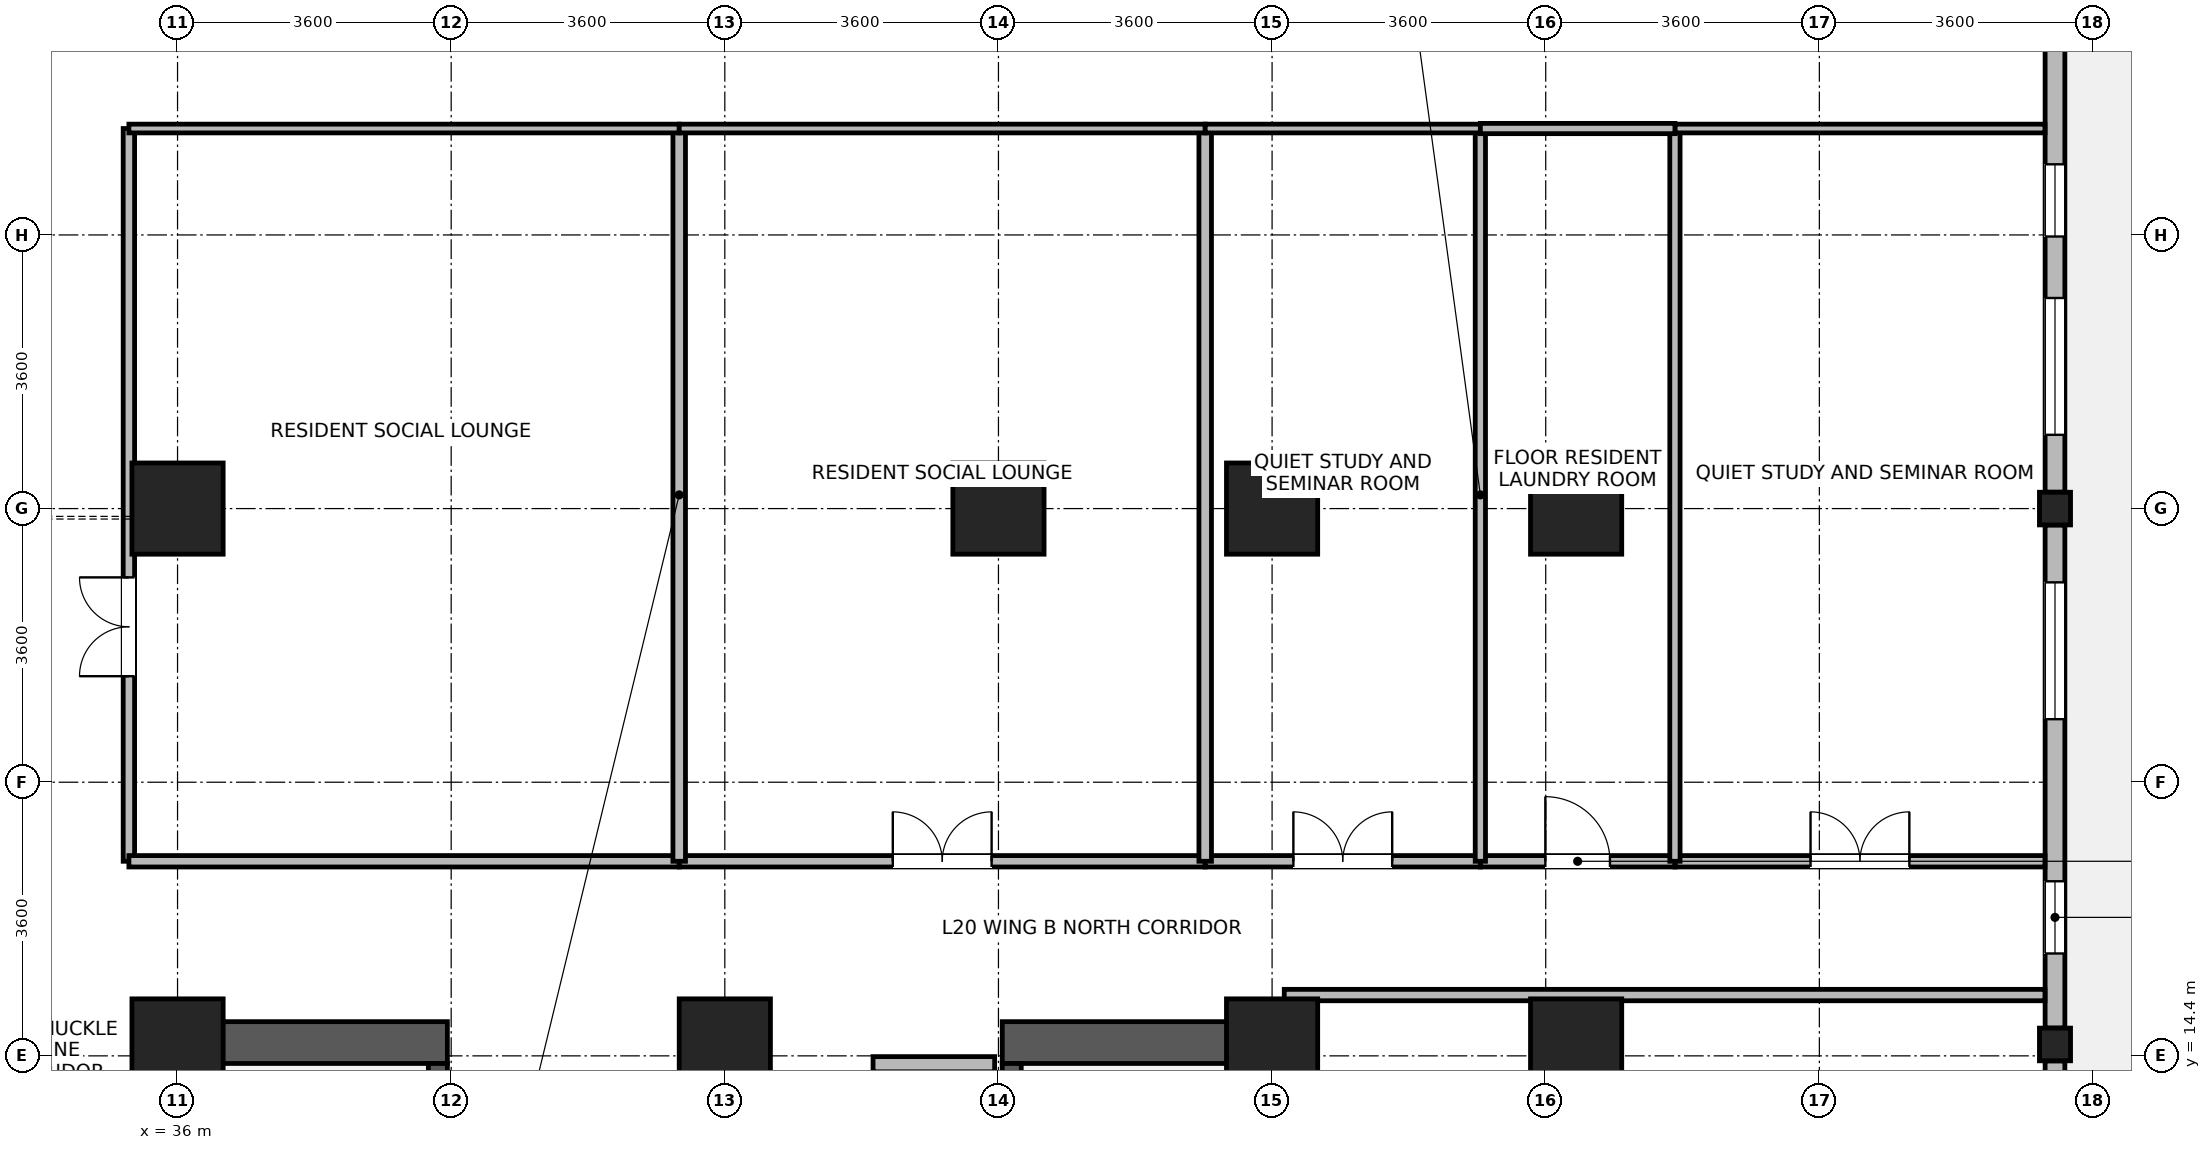
"""IFC4 building model, lengths in metres.
Left out: names, types, materials, properties, quantities, classifications, styles, units other than length and angle.
Written with IfcOpenShell. Run it as: python <this file> out.ifc"""

import sys

from ifc_helpers import new_model, si_unit, direction, frame, frame_2d, origin, origin_2d, place, context, subcontext, project, spatial, rectangle, i_section, extrude, source, transform, mapped, element, fill, save


model = new_model("IFC4")
c1 = context("Model", 3, precision=1e-05, world=origin(), true_north=direction((0.0, 1.0)))
c2 = subcontext(c1, "Body", "Model", "MODEL_VIEW")
j1 = project(units=[si_unit("LENGTHUNIT", "METRE"), si_unit("PLANEANGLEUNIT", "RADIAN")], contexts=[c1])
p1 = place(None, origin())
s1 = spatial("IfcSite", under=j1, at=p1, CompositionType="ELEMENT")
p2 = place(p1, origin())
s2 = spatial("IfcBuilding", under=s1, at=p2, CompositionType="ELEMENT")
p3 = place(p2, frame((0.0, 0.0, 82.3)))
s3 = spatial("IfcBuildingStorey", under=s2, at=p3, CompositionType="ELEMENT", Elevation=82.3)
for number, where, z_axis, x_axis in (
    (1, (36.075, 6.75, 0.0), (0.0, 0.0, 1.0), (0.0, 1.0, 0.0)),
    (2, (50.325, 6.75, 0.0), (0.0, 0.0, 1.0), (0.0, 1.0, 0.0)),
):
    element("IfcWall", number, at=place(p3, frame(where, z_axis=z_axis, x_axis=x_axis)), inside=s3, PredefinedType="SHEAR", context=c2, shape_type="SweptSolid", body=[
        extrude(rectangle(XDim=8.1, YDim=0.55, at=frame_2d((4.05, 0.0))), origin(), (0.0, 0.0, 1.0), 3.45),
    ])
for number, where, z_axis, x_axis in (
    (3, (36.35, 14.575, 0.0), (0.0, 0.0, 1.0), (1.0, 0.0, 0.0)),
    (4, (46.85, 14.575, 0.0), (0.0, 0.0, 1.0), (1.0, 0.0, 0.0)),
):
    element("IfcWall", number, at=place(p3, frame(where, z_axis=z_axis, x_axis=x_axis)), inside=s3, PredefinedType="SHEAR", context=c2, shape_type="SweptSolid", body=[
        extrude(rectangle(XDim=3.2, YDim=0.55, at=frame_2d((1.6, 0.0))), origin(), (0.0, 0.0, 1.0), 3.45),
    ])
p4 = place(p3, frame((39.425, 7.3, 0.0), z_axis=(0.0, 0.0, 1.0), x_axis=(0.0, 1.0, 0.0)))
e5 = element("IfcWall", 5, at=p4, inside=s3, PredefinedType="SHEAR", context=c2, shape_type="SweptSolid", body=[
    extrude(rectangle(XDim=7.0, YDim=0.25, at=frame_2d((3.5, 0.0))), origin(), (0.0, 0.0, 1.0), 3.45),
])
p5 = place(p4, frame((0.15, 0.0, 0.0)))
e6 = element("IfcOpeningElement", 6, at=p5, cuts=e5, PredefinedType="OPENING", context=c2, shape_type="SweptSolid", body=[
    extrude(rectangle(XDim=1.1, YDim=2.08, at=frame_2d((0.55, 1.04))), frame((0.0, 0.135, 0.0), z_axis=(0.0, -1.0, 0.0), x_axis=(1.0, 0.0, 0.0)), (0.0, 0.0, 1.0), 0.27),
])
p6 = place(p3, frame((46.975, 7.3, 0.0), z_axis=(0.0, 0.0, 1.0), x_axis=(0.0, 1.0, 0.0)))
e7 = element("IfcWall", 7, at=p6, inside=s3, PredefinedType="SHEAR", context=c2, shape_type="SweptSolid", body=[
    extrude(rectangle(XDim=7.0, YDim=0.25, at=frame_2d((3.5, 0.0))), origin(), (0.0, 0.0, 1.0), 3.45),
])
p7 = place(p6, frame((0.15, 0.0, 0.0)))
e8 = element("IfcOpeningElement", 8, at=p7, cuts=e7, PredefinedType="OPENING", context=c2, shape_type="SweptSolid", body=[
    extrude(rectangle(XDim=1.1, YDim=2.08, at=frame_2d((0.55, 1.04))), frame((0.0, 0.135, 0.0), z_axis=(0.0, -1.0, 0.0), x_axis=(1.0, 0.0, 0.0)), (0.0, 0.0, 1.0), 0.27),
])
m1 = source(origin(), c2, "Body", "SweptSolid", [
    extrude(rectangle(XDim=1.2, YDim=1.2, at=origin_2d()), origin(), (0.0, 0.0, 1.0), 3.7),
])
for number, where, z_axis, x_axis in (
    (9, (36.0, 21.6, 0.0), (0.0, 0.0, 1.0), (1.0, 0.0, 0.0)),
    (10, (46.8, 21.6, 0.0), (0.0, 0.0, 1.0), (1.0, 0.0, 0.0)),
    (11, (36.0, 14.55, 0.0), (0.0, 0.0, 1.0), (1.0, 0.0, 0.0)),
    (12, (43.2, 14.55, 0.0), (0.0, 0.0, 1.0), (1.0, 0.0, 0.0)),
    (13, (50.4, 14.55, 0.0), (0.0, 0.0, 1.0), (1.0, 0.0, 0.0)),
    (14, (50.4, 21.6, 0.0), (0.0, 0.0, 1.0), (1.0, 0.0, 0.0)),
    (15, (54.4, 14.55, 0.0), (0.0, 0.0, 1.0), (1.0, 0.0, 0.0)),
    (16, (54.4, 21.6, 0.0), (0.0, 0.0, 1.0), (1.0, 0.0, 0.0)),
):
    element("IfcColumn", number, at=place(p3, frame(where, z_axis=z_axis, x_axis=x_axis)), inside=s3, PredefinedType="COLUMN", context=c2, shape_type="MappedRepresentation", body=[
        mapped(m1, transform((0.0, 0.0, 0.0), x_axis=(1.0, 0.0, 0.0), y_axis=(0.0, 1.0, 0.0), z_axis=(0.0, 0.0, 1.0), scale=1.0)),
    ])
m2 = source(origin(), c2, "Body", "SweptSolid", [
    extrude(i_section(OverallWidth=0.409, OverallDepth=0.43, WebThickness=0.024, FlangeThickness=0.033, FilletRadius=0.015, at=origin_2d()), origin(), (0.0, 0.0, 1.0), 3.7),
])
for number, where, z_axis, x_axis in (
    (17, (60.7, 14.55, 0.0), (0.0, 0.0, 1.0), (1.0, 0.0, 0.0)),
    (18, (60.7, 21.6, 0.0), (0.0, 0.0, 1.0), (1.0, 0.0, 0.0)),
):
    element("IfcColumn", number, at=place(p3, frame(where, z_axis=z_axis, x_axis=x_axis)), inside=s3, PredefinedType="COLUMN", context=c2, shape_type="MappedRepresentation", body=[
        mapped(m2, transform((0.0, 0.0, 0.0), x_axis=(1.0, 0.0, 0.0), y_axis=(0.0, 1.0, 0.0), z_axis=(0.0, 0.0, 1.0), scale=1.0)),
    ])
p8 = place(p3, frame((60.7, 14.334, 0.0), z_axis=(0.0, 0.0, 1.0), x_axis=(0.0, -1.0, 0.0)))
e19 = element("IfcWall", 19, at=p8, inside=s3, PredefinedType="STANDARD", context=c2, shape_type="SweptSolid", body=[
    extrude(rectangle(XDim=7.068, YDim=0.26, at=frame_2d((3.534, 0.0))), origin(), (0.0, 0.0, 1.0), 2.93),
])
p9 = place(p8, frame((0.867, 0.0, 0.85)))
e20 = element("IfcOpeningElement", 20, at=p9, cuts=e19, PredefinedType="OPENING", context=c2, shape_type="SweptSolid", body=[
    extrude(rectangle(XDim=1.8, YDim=1.85, at=frame_2d((0.9, 0.925))), frame((0.0, 0.14, 0.0), z_axis=(0.0, -1.0, 0.0), x_axis=(1.0, 0.0, 0.0)), (0.0, 0.0, 1.0), 0.28),
])
p10 = place(p8, frame((4.401, 0.0, 0.85)))
e21 = element("IfcOpeningElement", 21, at=p10, cuts=e19, PredefinedType="OPENING", context=c2, shape_type="SweptSolid", body=[
    extrude(rectangle(XDim=1.8, YDim=1.85, at=frame_2d((0.9, 0.925))), frame((0.0, 0.14, 0.0), z_axis=(0.0, -1.0, 0.0), x_axis=(1.0, 0.0, 0.0)), (0.0, 0.0, 1.0), 0.28),
])
p11 = place(p3, frame((60.7, 21.384, 0.0), z_axis=(0.0, 0.0, 1.0), x_axis=(0.0, -1.0, 0.0)))
e22 = element("IfcWall", 22, at=p11, inside=s3, PredefinedType="STANDARD", context=c2, shape_type="SweptSolid", body=[
    extrude(rectangle(XDim=6.618, YDim=0.26, at=frame_2d((3.309, 0.0))), origin(), (0.0, 0.0, 1.0), 2.93),
])
p12 = place(p11, frame((0.754, 0.0, 0.85)))
e23 = element("IfcOpeningElement", 23, at=p12, cuts=e22, PredefinedType="OPENING", context=c2, shape_type="SweptSolid", body=[
    extrude(rectangle(XDim=1.8, YDim=1.85, at=frame_2d((0.9, 0.925))), frame((0.0, 0.14, 0.0), z_axis=(0.0, -1.0, 0.0), x_axis=(1.0, 0.0, 0.0)), (0.0, 0.0, 1.0), 0.28),
])
p13 = place(p11, frame((4.687, 0.0, 0.85)))
e24 = element("IfcOpeningElement", 24, at=p13, cuts=e22, PredefinedType="OPENING", context=c2, shape_type="SweptSolid", body=[
    extrude(rectangle(XDim=0.95, YDim=1.75, at=frame_2d((0.475, 0.875))), frame((0.0, 0.14, 0.0), z_axis=(0.0, -1.0, 0.0), x_axis=(1.0, 0.0, 0.0)), (0.0, 0.0, 1.0), 0.28),
])
p14 = place(p3, frame((60.7, 28.434, 0.0), z_axis=(0.0, 0.0, 1.0), x_axis=(0.0, -1.0, 0.0)))
e25 = element("IfcWall", 25, at=p14, inside=s3, PredefinedType="STANDARD", context=c2, shape_type="SweptSolid", body=[
    extrude(rectangle(XDim=6.618, YDim=0.26, at=frame_2d((3.309, 0.0))), origin(), (0.0, 0.0, 1.0), 2.93),
])
p15 = place(p14, frame((4.063, 0.0, 0.85)))
e26 = element("IfcOpeningElement", 26, at=p15, cuts=e25, PredefinedType="OPENING", context=c2, shape_type="SweptSolid", body=[
    extrude(rectangle(XDim=1.8, YDim=1.85, at=frame_2d((0.9, 0.925))), frame((0.0, 0.14, 0.0), z_axis=(0.0, -1.0, 0.0), x_axis=(1.0, 0.0, 0.0)), (0.0, 0.0, 1.0), 0.28),
])
p16 = place(p14, frame((2.305, 0.0, 0.85)))
e27 = element("IfcOpeningElement", 27, at=p16, cuts=e25, PredefinedType="OPENING", context=c2, shape_type="SweptSolid", body=[
    extrude(rectangle(XDim=0.95, YDim=1.75, at=frame_2d((0.475, 0.875))), frame((0.0, 0.14, 0.0), z_axis=(0.0, -1.0, 0.0), x_axis=(1.0, 0.0, 0.0)), (0.0, 0.0, 1.0), 0.28),
])
p17 = place(p3, frame((45.15, 14.29, 0.0), z_axis=(0.0, 0.0, 1.0), x_axis=(1.0, 0.0, 0.0)))
e28 = element("IfcWall", 28, at=p17, inside=s3, PredefinedType="PARTITIONING", context=c2, shape_type="SweptSolid", body=[
    extrude(rectangle(XDim=1.6, YDim=0.2, at=frame_2d((0.8, 0.0))), origin(), (0.0, 0.0, 1.0), 2.23),
])
p18 = place(p3, frame((50.56, 15.2, 0.0), z_axis=(0.0, 0.0, 1.0), x_axis=(1.0, 0.0, 0.0)))
e29 = element("IfcWall", 29, at=p18, inside=s3, PredefinedType="PARTITIONING", context=c2, shape_type="SweptSolid", body=[
    extrude(rectangle(XDim=10.008, YDim=0.15, at=frame_2d((5.004, 0.0))), origin(), (0.0, 0.0, 1.0), 3.43),
])
p19 = place(p3, frame((35.36, 16.96, 0.0), z_axis=(0.0, 0.0, 1.0), x_axis=(0.0, 1.0, 0.0)))
e30 = element("IfcWall", 30, at=p19, inside=s3, PredefinedType="PARTITIONING", context=c2, shape_type="SweptSolid", body=[
    extrude(rectangle(XDim=9.64, YDim=0.15, at=frame_2d((4.82, 0.0))), origin(), (0.0, 0.0, 1.0), 3.43),
])
p20 = place(p19, frame((2.435, 0.0, 0.0)))
e31 = element("IfcOpeningElement", 31, at=p20, cuts=e30, PredefinedType="OPENING", context=c2, shape_type="SweptSolid", body=[
    extrude(rectangle(XDim=1.3, YDim=2.12, at=frame_2d((0.65, 1.06))), frame((0.0, 0.085, 0.0), z_axis=(0.0, -1.0, 0.0), x_axis=(1.0, 0.0, 0.0)), (0.0, 0.0, 1.0), 0.17),
])
p21 = place(p3, frame((35.36, 16.96, 0.0), z_axis=(0.0, 0.0, 1.0), x_axis=(1.0, 0.0, 0.0)))
e32 = element("IfcWall", 32, at=p21, inside=s3, PredefinedType="PARTITIONING", context=c2, shape_type="SweptSolid", body=[
    extrude(rectangle(XDim=7.24, YDim=0.15, at=frame_2d((3.62, 0.0))), origin(), (0.0, 0.0, 1.0), 3.43),
])
p22 = place(p3, frame((42.6, 16.96, 0.0), z_axis=(0.0, 0.0, 1.0), x_axis=(1.0, 0.0, 0.0)))
e33 = element("IfcWall", 33, at=p22, inside=s3, PredefinedType="PARTITIONING", context=c2, shape_type="SweptSolid", body=[
    extrude(rectangle(XDim=6.92, YDim=0.15, at=frame_2d((3.46, 0.0))), origin(), (0.0, 0.0, 1.0), 3.43),
])
p23 = place(p22, frame((2.81, 0.0, 0.0)))
e34 = element("IfcOpeningElement", 34, at=p23, cuts=e33, PredefinedType="OPENING", context=c2, shape_type="SweptSolid", body=[
    extrude(rectangle(XDim=1.3, YDim=2.12, at=frame_2d((0.65, 1.06))), frame((0.0, 0.085, 0.0), z_axis=(0.0, -1.0, 0.0), x_axis=(1.0, 0.0, 0.0)), (0.0, 0.0, 1.0), 0.17),
])
p24 = place(p3, frame((55.7, 16.96, 0.0), z_axis=(0.0, 0.0, 1.0), x_axis=(1.0, 0.0, 0.0)))
e35 = element("IfcWall", 35, at=p24, inside=s3, PredefinedType="PARTITIONING", context=c2, shape_type="SweptSolid", body=[
    extrude(rectangle(XDim=4.868, YDim=0.15, at=frame_2d((2.434, 0.0))), origin(), (0.0, 0.0, 1.0), 3.43),
])
p25 = place(p24, frame((1.784, 0.0, 0.0)))
e36 = element("IfcOpeningElement", 36, at=p25, cuts=e35, PredefinedType="OPENING", context=c2, shape_type="SweptSolid", body=[
    extrude(rectangle(XDim=1.3, YDim=2.12, at=frame_2d((0.65, 1.06))), frame((0.0, 0.085, 0.0), z_axis=(0.0, -1.0, 0.0), x_axis=(1.0, 0.0, 0.0)), (0.0, 0.0, 1.0), 0.17),
])
p26 = place(p3, frame((49.52, 16.96, 0.0), z_axis=(0.0, 0.0, 1.0), x_axis=(1.0, 0.0, 0.0)))
e37 = element("IfcWall", 37, at=p26, inside=s3, PredefinedType="PARTITIONING", context=c2, shape_type="SweptSolid", body=[
    extrude(rectangle(XDim=3.62, YDim=0.15, at=frame_2d((1.81, 0.0))), origin(), (0.0, 0.0, 1.0), 3.43),
])
p27 = place(p26, frame((1.16, 0.0, 0.0)))
e38 = element("IfcOpeningElement", 38, at=p27, cuts=e37, PredefinedType="OPENING", context=c2, shape_type="SweptSolid", body=[
    extrude(rectangle(XDim=1.3, YDim=2.12, at=frame_2d((0.65, 1.06))), frame((0.0, 0.085, 0.0), z_axis=(0.0, -1.0, 0.0), x_axis=(1.0, 0.0, 0.0)), (0.0, 0.0, 1.0), 0.17),
])
p28 = place(p3, frame((53.14, 16.96, 0.0), z_axis=(0.0, 0.0, 1.0), x_axis=(1.0, 0.0, 0.0)))
e39 = element("IfcWall", 39, at=p28, inside=s3, PredefinedType="PARTITIONING", context=c2, shape_type="SweptSolid", body=[
    extrude(rectangle(XDim=2.56, YDim=0.15, at=frame_2d((1.28, 0.0))), origin(), (0.0, 0.0, 1.0), 3.43),
])
p29 = place(p28, frame((0.855, 0.0, 0.0)))
e40 = element("IfcOpeningElement", 40, at=p29, cuts=e39, PredefinedType="OPENING", context=c2, shape_type="SweptSolid", body=[
    extrude(rectangle(XDim=0.85, YDim=2.04, at=frame_2d((0.425, 1.02))), frame((0.0, 0.085, 0.0), z_axis=(0.0, -1.0, 0.0), x_axis=(1.0, 0.0, 0.0)), (0.0, 0.0, 1.0), 0.17),
])
for number, where, z_axis, x_axis in (
    (41, (42.6, 16.96, 0.0), (0.0, 0.0, 1.0), (0.0, 1.0, 0.0)),
    (42, (49.52, 16.96, 0.0), (0.0, 0.0, 1.0), (0.0, 1.0, 0.0)),
):
    element("IfcWall", number, at=place(p3, frame(where, z_axis=z_axis, x_axis=x_axis)), inside=s3, PredefinedType="PARTITIONING", context=c2, shape_type="SweptSolid", body=[
        extrude(rectangle(XDim=9.64, YDim=0.165, at=frame_2d((4.82, 0.0))), origin(), (0.0, 0.0, 1.0), 3.43),
    ])
for number, where, z_axis, x_axis in (
    (43, (53.14, 16.96, 0.0), (0.0, 0.0, 1.0), (0.0, 1.0, 0.0)),
    (44, (55.7, 16.96, 0.0), (0.0, 0.0, 1.0), (0.0, 1.0, 0.0)),
):
    element("IfcWall", number, at=place(p3, frame(where, z_axis=z_axis, x_axis=x_axis)), inside=s3, PredefinedType="PARTITIONING", context=c2, shape_type="SweptSolid", body=[
        extrude(rectangle(XDim=9.64, YDim=0.135, at=frame_2d((4.82, 0.0))), origin(), (0.0, 0.0, 1.0), 3.43),
    ])
p30 = place(p3, frame((35.36, 26.6, 0.0), z_axis=(0.0, 0.0, 1.0), x_axis=(1.0, 0.0, 0.0)))
e45 = element("IfcWall", 45, at=p30, inside=s3, PredefinedType="PARTITIONING", context=c2, shape_type="SweptSolid", body=[
    extrude(rectangle(XDim=7.24, YDim=0.115, at=frame_2d((3.62, 0.0))), origin(), (0.0, 0.0, 1.0), 3.43),
])
p31 = place(p3, frame((42.6, 26.6, 0.0), z_axis=(0.0, 0.0, 1.0), x_axis=(1.0, 0.0, 0.0)))
e46 = element("IfcWall", 46, at=p31, inside=s3, PredefinedType="PARTITIONING", context=c2, shape_type="SweptSolid", body=[
    extrude(rectangle(XDim=6.92, YDim=0.115, at=frame_2d((3.46, 0.0))), origin(), (0.0, 0.0, 1.0), 3.43),
])
p32 = place(p3, frame((55.7, 26.6, 0.0), z_axis=(0.0, 0.0, 1.0), x_axis=(1.0, 0.0, 0.0)))
e47 = element("IfcWall", 47, at=p32, inside=s3, PredefinedType="PARTITIONING", context=c2, shape_type="SweptSolid", body=[
    extrude(rectangle(XDim=4.868, YDim=0.115, at=frame_2d((2.434, 0.0))), origin(), (0.0, 0.0, 1.0), 3.43),
])
p33 = place(p3, frame((49.52, 26.6, 0.0), z_axis=(0.0, 0.0, 1.0), x_axis=(1.0, 0.0, 0.0)))
e48 = element("IfcWall", 48, at=p33, inside=s3, PredefinedType="PARTITIONING", context=c2, shape_type="SweptSolid", body=[
    extrude(rectangle(XDim=3.62, YDim=0.115, at=frame_2d((1.81, 0.0))), origin(), (0.0, 0.0, 1.0), 3.43),
])
p34 = place(p3, frame((53.14, 26.6, 0.0), z_axis=(0.0, 0.0, 1.0), x_axis=(1.0, 0.0, 0.0)))
e49 = element("IfcWall", 49, at=p34, inside=s3, PredefinedType="PARTITIONING", context=c2, shape_type="SweptSolid", body=[
    extrude(rectangle(XDim=2.56, YDim=0.135, at=frame_2d((1.28, 0.0))), origin(), (0.0, 0.0, 1.0), 3.43),
])
p35 = place(p12, origin())
e50 = element("IfcWindow", 50, at=p35, inside=s3, PartitioningType="SINGLE_PANEL", PredefinedType="WINDOW", context=c2, shape_type="SweptSolid", body=[
    extrude(rectangle(XDim=1.8, YDim=1.85, at=frame_2d((0.9, 0.925))), frame((0.0, 0.03, 0.0), z_axis=(0.0, -1.0, 0.0), x_axis=(1.0, 0.0, 0.0)), (0.0, 0.0, 1.0), 0.06),
])
fill(e23, e50)
p36 = place(p13, origin())
e51 = element("IfcWindow", 51, at=p36, inside=s3, PartitioningType="SINGLE_PANEL", PredefinedType="WINDOW", context=c2, shape_type="SweptSolid", body=[
    extrude(rectangle(XDim=0.95, YDim=1.75, at=frame_2d((0.475, 0.875))), frame((0.0, 0.03, 0.0), z_axis=(0.0, -1.0, 0.0), x_axis=(1.0, 0.0, 0.0)), (0.0, 0.0, 1.0), 0.06),
])
fill(e24, e51)
p37 = place(p15, origin())
e52 = element("IfcWindow", 52, at=p37, inside=s3, PartitioningType="SINGLE_PANEL", PredefinedType="WINDOW", context=c2, shape_type="SweptSolid", body=[
    extrude(rectangle(XDim=1.8, YDim=1.85, at=frame_2d((0.9, 0.925))), frame((0.0, 0.03, 0.0), z_axis=(0.0, -1.0, 0.0), x_axis=(1.0, 0.0, 0.0)), (0.0, 0.0, 1.0), 0.06),
])
fill(e26, e52)
p38 = place(p16, origin())
e53 = element("IfcWindow", 53, at=p38, inside=s3, PartitioningType="SINGLE_PANEL", PredefinedType="WINDOW", context=c2, shape_type="SweptSolid", body=[
    extrude(rectangle(XDim=0.95, YDim=1.75, at=frame_2d((0.475, 0.875))), frame((0.0, 0.03, 0.0), z_axis=(0.0, -1.0, 0.0), x_axis=(1.0, 0.0, 0.0)), (0.0, 0.0, 1.0), 0.06),
])
fill(e27, e53)
p39 = place(p20, origin())
e54 = element("IfcDoor", 54, at=p39, inside=s3, OperationType="DOUBLE_DOOR_SINGLE_SWING", PredefinedType="DOOR", context=c2, shape_type="SweptSolid", body=[
    extrude(rectangle(XDim=1.3, YDim=2.12, at=frame_2d((0.65, 1.06))), frame((0.0, 0.025, 0.0), z_axis=(0.0, -1.0, 0.0), x_axis=(1.0, 0.0, 0.0)), (0.0, 0.0, 1.0), 0.05),
])
fill(e31, e54)
p40 = place(p23, origin())
e55 = element("IfcDoor", 55, at=p40, inside=s3, OperationType="DOUBLE_DOOR_SINGLE_SWING", PredefinedType="DOOR", context=c2, shape_type="SweptSolid", body=[
    extrude(rectangle(XDim=1.3, YDim=2.12, at=frame_2d((0.65, 1.06))), frame((0.0, 0.025, 0.0), z_axis=(0.0, -1.0, 0.0), x_axis=(1.0, 0.0, 0.0)), (0.0, 0.0, 1.0), 0.05),
])
fill(e34, e55)
p41 = place(p25, origin())
e56 = element("IfcDoor", 56, at=p41, inside=s3, OperationType="DOUBLE_DOOR_SINGLE_SWING", PredefinedType="DOOR", context=c2, shape_type="SweptSolid", body=[
    extrude(rectangle(XDim=1.3, YDim=2.12, at=frame_2d((0.65, 1.06))), frame((0.0, 0.025, 0.0), z_axis=(0.0, -1.0, 0.0), x_axis=(1.0, 0.0, 0.0)), (0.0, 0.0, 1.0), 0.05),
])
fill(e36, e56)
p42 = place(p27, origin())
e57 = element("IfcDoor", 57, at=p42, inside=s3, OperationType="DOUBLE_DOOR_SINGLE_SWING", PredefinedType="DOOR", context=c2, shape_type="SweptSolid", body=[
    extrude(rectangle(XDim=1.3, YDim=2.12, at=frame_2d((0.65, 1.06))), frame((0.0, 0.025, 0.0), z_axis=(0.0, -1.0, 0.0), x_axis=(1.0, 0.0, 0.0)), (0.0, 0.0, 1.0), 0.05),
])
fill(e38, e57)
p43 = place(p29, origin())
e58 = element("IfcDoor", 58, at=p43, inside=s3, OperationType="SINGLE_SWING_LEFT", PredefinedType="DOOR", context=c2, shape_type="SweptSolid", body=[
    extrude(rectangle(XDim=0.85, YDim=2.04, at=frame_2d((0.425, 1.02))), frame((0.0, 0.025, 0.0), z_axis=(0.0, -1.0, 0.0), x_axis=(1.0, 0.0, 0.0)), (0.0, 0.0, 1.0), 0.05),
])
fill(e40, e58)
save(model, sys.argv[1])
